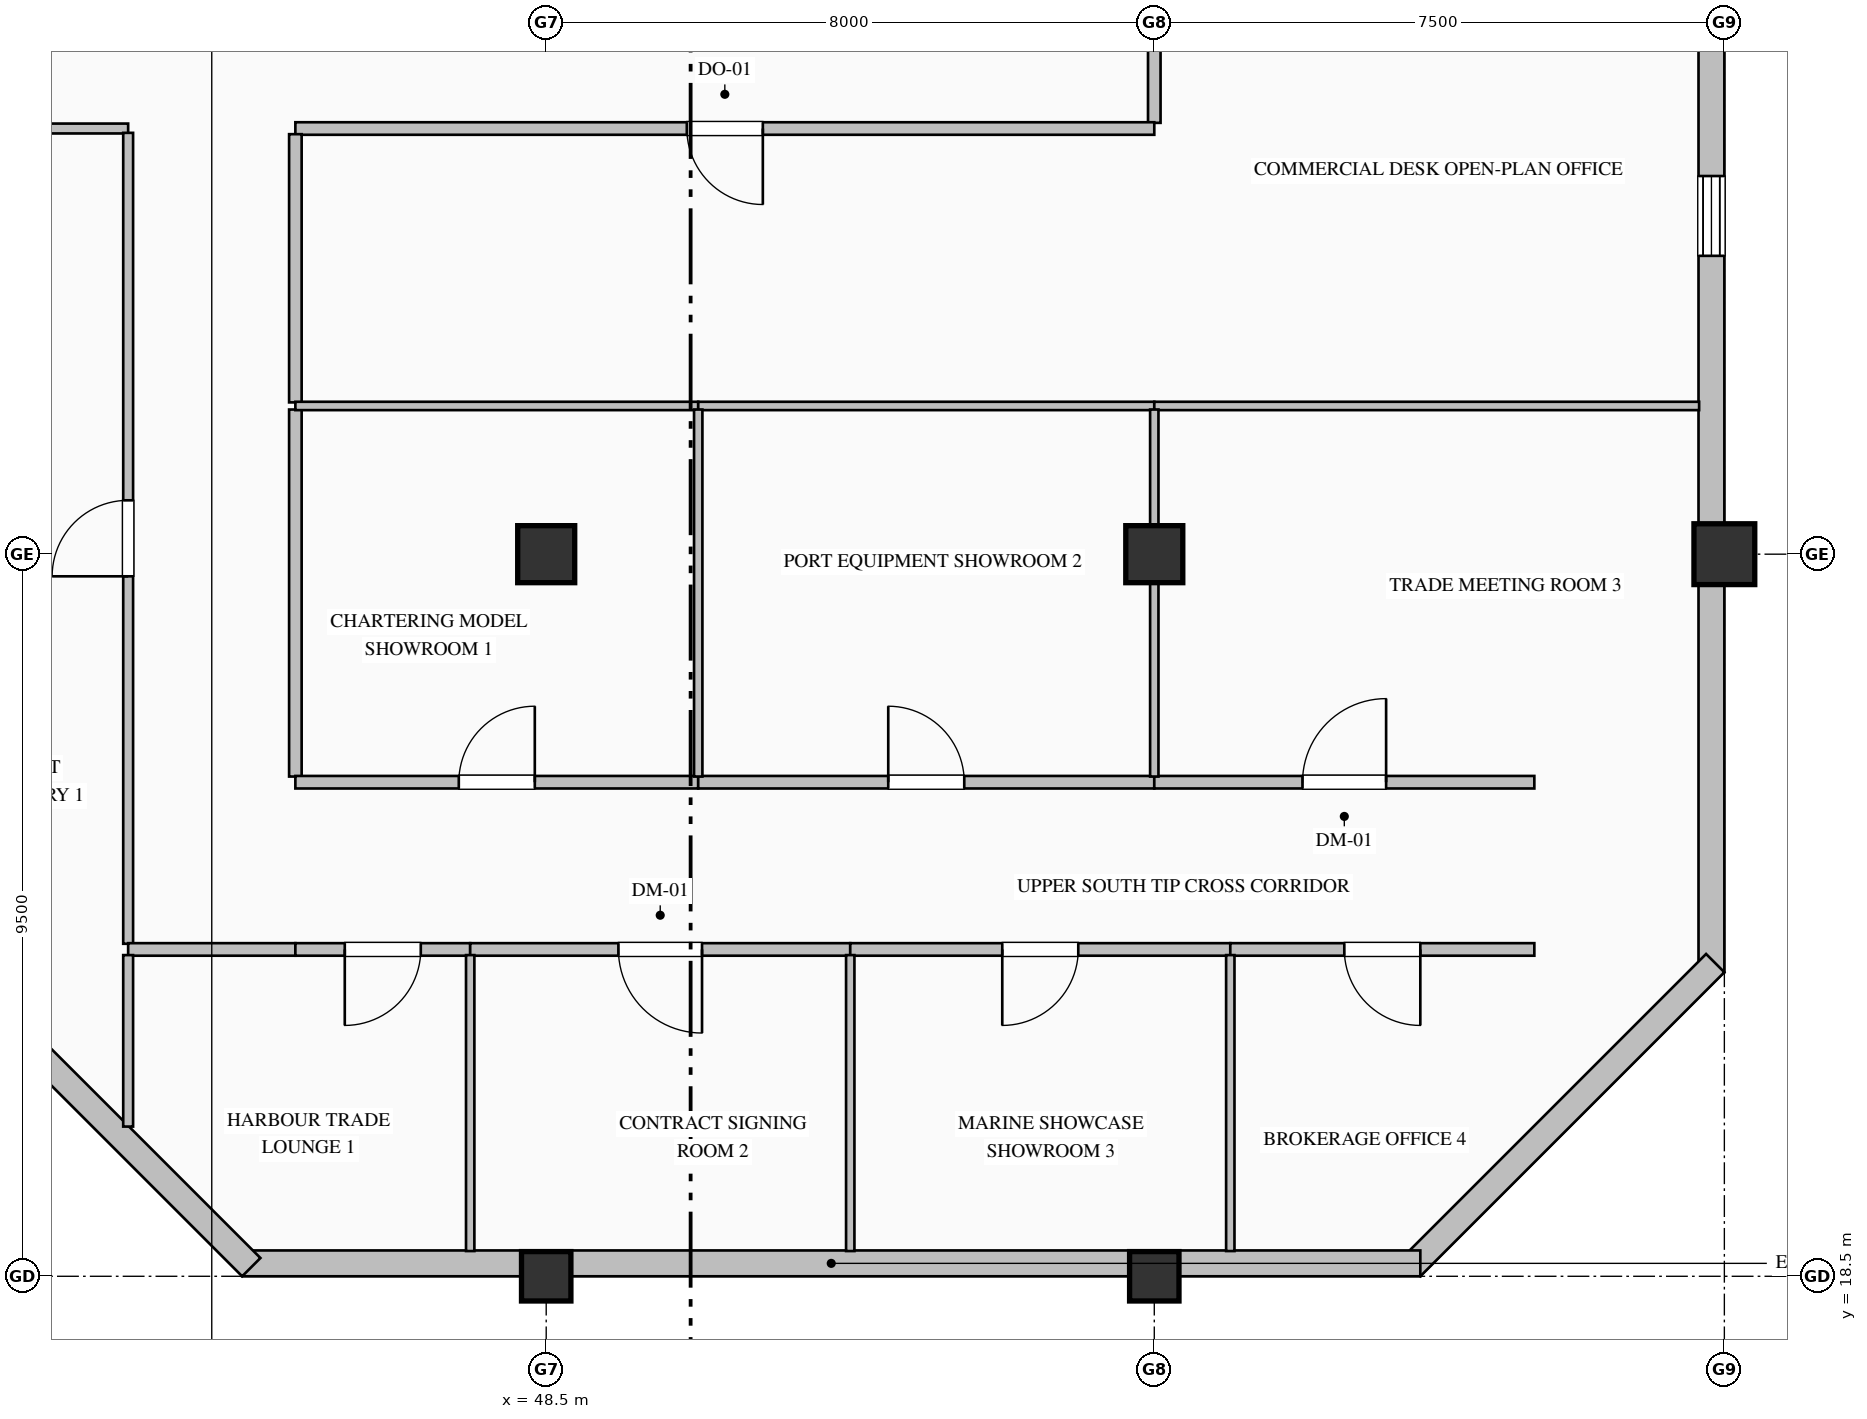
"""IFC4 building model, lengths in metres.
Left out: names, types, materials, properties, quantities, classifications, styles, units other than length and angle.
Written with IfcOpenShell. Run it as: python <this file> out.ifc"""

import sys

from ifc_helpers import new_model, si_unit, direction, frame, frame_2d, origin, origin_2d, place, context, subcontext, project, spatial, rectangle, hollow_rectangle, extrude, element, fill, save


model = new_model("IFC4")
c1 = context("Model", 3, precision=1e-05, world=origin(), true_north=direction((0.0, 1.0)))
c2 = subcontext(c1, "Body", "Model", "MODEL_VIEW")
j1 = project(units=[si_unit("LENGTHUNIT", "METRE"), si_unit("PLANEANGLEUNIT", "RADIAN")], contexts=[c1])
p1 = place(None, origin())
s1 = spatial("IfcSite", under=j1, at=p1, CompositionType="ELEMENT")
p2 = place(p1, origin())
s2 = spatial("IfcBuilding", under=s1, at=p2, CompositionType="ELEMENT")
p3 = place(p2, frame((0.0, 0.0, 351.2)))
s3 = spatial("IfcBuildingStorey", under=s2, at=p3, CompositionType="ELEMENT", Elevation=351.2)
p4 = place(p3, frame((48.5, 18.5, 0.0), z_axis=(0.0, 0.0, 1.0), x_axis=(1.0, 0.0, 0.0)))
e1 = element("IfcColumn", 1, at=p4, inside=s3, PredefinedType="COLUMN", context=c2, shape_type="SweptSolid", body=[
    extrude(hollow_rectangle(XDim=0.65, YDim=0.65, WallThickness=0.028, at=origin_2d()), origin(), (0.0, 0.0, 1.0), 4.0),
])
p5 = place(p3, frame((48.5, 28.0, 0.0), z_axis=(0.0, 0.0, 1.0), x_axis=(1.0, 0.0, 0.0)))
e2 = element("IfcColumn", 2, at=p5, inside=s3, PredefinedType="COLUMN", context=c2, shape_type="SweptSolid", body=[
    extrude(rectangle(XDim=0.75, YDim=0.75, at=origin_2d()), origin(), (0.0, 0.0, 1.0), 4.0),
])
p6 = place(p3, frame((56.5, 18.5, 0.0), z_axis=(0.0, 0.0, 1.0), x_axis=(1.0, 0.0, 0.0)))
e3 = element("IfcColumn", 3, at=p6, inside=s3, PredefinedType="COLUMN", context=c2, shape_type="SweptSolid", body=[
    extrude(hollow_rectangle(XDim=0.65, YDim=0.65, WallThickness=0.028, at=origin_2d()), origin(), (0.0, 0.0, 1.0), 4.0),
])
p7 = place(p3, frame((56.5, 28.0, 0.0), z_axis=(0.0, 0.0, 1.0), x_axis=(1.0, 0.0, 0.0)))
e4 = element("IfcColumn", 4, at=p7, inside=s3, PredefinedType="COLUMN", context=c2, shape_type="SweptSolid", body=[
    extrude(rectangle(XDim=0.75, YDim=0.75, at=origin_2d()), origin(), (0.0, 0.0, 1.0), 4.0),
])
p8 = place(p3, frame((64.0, 28.0, 0.0), z_axis=(0.0, 0.0, 1.0), x_axis=(1.0, 0.0, 0.0)))
e5 = element("IfcColumn", 5, at=p8, inside=s3, PredefinedType="COLUMN", context=c2, shape_type="SweptSolid", body=[
    extrude(hollow_rectangle(XDim=0.8, YDim=0.8, WallThickness=0.032, at=origin_2d()), origin(), (0.0, 0.0, 1.0), 4.0),
])
p9 = place(p3, frame((63.83, 36.05, 0.0), z_axis=(0.0, 0.0, 1.0), x_axis=(0.0, -1.0, 0.0)))
e6 = element("IfcWall", 6, at=p9, inside=s3, PredefinedType="SOLIDWALL", context=c2, shape_type="SweptSolid", body=[
    extrude(rectangle(XDim=13.55, YDim=0.34, at=frame_2d((6.775, 0.0))), origin(), (0.0, 0.0, 1.0), 3.335),
])
p10 = place(p9, frame((3.075, 0.0, 0.8)))
e7 = element("IfcOpeningElement", 7, at=p10, cuts=e6, PredefinedType="OPENING", context=c2, shape_type="SweptSolid", body=[
    extrude(rectangle(XDim=1.05, YDim=2.15, at=frame_2d((0.525, 1.075))), frame((0.0, 0.18, 0.0), z_axis=(0.0, -1.0, 0.0), x_axis=(1.0, 0.0, 0.0)), (0.0, 0.0, 1.0), 0.36),
])
p11 = place(p3, frame((63.88, 22.62, 0.0), z_axis=(0.0, 0.0, 1.0), x_axis=(-0.707106781187, -0.707106781187, 0.0)))
e8 = element("IfcWall", 8, at=p11, inside=s3, PredefinedType="SOLIDWALL", context=c2, shape_type="SweptSolid", body=[
    extrude(rectangle(XDim=5.657, YDim=0.34, at=frame_2d((2.828, 0.0))), origin(), (0.0, 0.0, 1.0), 3.785),
])
p12 = place(p3, frame((60.0, 18.67, 0.0), z_axis=(0.0, 0.0, 1.0), x_axis=(-1.0, 0.0, 0.0)))
e9 = element("IfcWall", 9, at=p12, inside=s3, PredefinedType="SOLIDWALL", context=c2, shape_type="SweptSolid", body=[
    extrude(rectangle(XDim=15.5, YDim=0.34, at=frame_2d((7.75, 0.0))), origin(), (0.0, 0.0, 1.0), 3.335),
])
p13 = place(p3, frame((44.62, 18.62, 0.0), z_axis=(0.0, 0.0, 1.0), x_axis=(-0.707106781187, 0.707106781187, 0.0)))
e10 = element("IfcWall", 10, at=p13, inside=s3, PredefinedType="SOLIDWALL", context=c2, shape_type="SweptSolid", body=[
    extrude(rectangle(XDim=5.657, YDim=0.34, at=frame_2d((2.828, 0.0))), origin(), (0.0, 0.0, 1.0), 3.785),
])
p14 = place(p3, frame((56.5, 36.0, 0.0), z_axis=(0.0, 0.0, 1.0), x_axis=(0.0, -1.0, 0.0)))
e11 = element("IfcWall", 11, at=p14, inside=s3, PredefinedType="PARTITIONING", context=c2, shape_type="SweptSolid", body=[
    extrude(rectangle(XDim=2.325, YDim=0.165, at=frame_2d((1.163, 0.0))), origin(), (0.0, 0.0, 1.0), 3.177),
])
p15 = place(p3, frame((56.5, 33.6, 0.0), z_axis=(0.0, 0.0, 1.0), x_axis=(-1.0, 0.0, 0.0)))
e12 = element("IfcWall", 12, at=p15, inside=s3, PredefinedType="PARTITIONING", context=c2, shape_type="SweptSolid", body=[
    extrude(rectangle(XDim=11.3, YDim=0.165, at=frame_2d((5.65, 0.0))), origin(), (0.0, 0.0, 1.0), 3.785),
])
p16 = place(p15, frame((5.15, 0.0, 0.0)))
e13 = element("IfcOpeningElement", 13, at=p16, cuts=e12, PredefinedType="OPENING", context=c2, shape_type="SweptSolid", body=[
    extrude(rectangle(XDim=1.0, YDim=2.15, at=frame_2d((0.5, 1.075))), frame((0.0, 0.093, 0.0), z_axis=(0.0, -1.0, 0.0), x_axis=(1.0, 0.0, 0.0)), (0.0, 0.0, 1.0), 0.185),
])
p17 = place(p3, frame((43.0, 33.6, 0.0), z_axis=(0.0, 0.0, 1.0), x_axis=(-1.0, 0.0, 0.0)))
e14 = element("IfcWall", 14, at=p17, inside=s3, PredefinedType="PARTITIONING", context=c2, shape_type="SweptSolid", body=[
    extrude(rectangle(XDim=2.5, YDim=0.13, at=frame_2d((1.25, 0.0))), origin(), (0.0, 0.0, 1.0), 3.785),
])
p18 = place(p3, frame((45.2, 33.525, 0.0), z_axis=(0.0, 0.0, 1.0), x_axis=(0.0, -1.0, 0.0)))
e15 = element("IfcWall", 15, at=p18, inside=s3, PredefinedType="PARTITIONING", context=c2, shape_type="SweptSolid", body=[
    extrude(rectangle(XDim=3.528, YDim=0.165, at=frame_2d((1.764, 0.0))), origin(), (0.0, 0.0, 1.0), 3.785),
])
p19 = place(p3, frame((45.2, 29.903, 0.0), z_axis=(0.0, 0.0, 1.0), x_axis=(0.0, -1.0, 0.0)))
e16 = element("IfcWall", 16, at=p19, inside=s3, PredefinedType="PARTITIONING", context=c2, shape_type="SweptSolid", body=[
    extrude(rectangle(XDim=4.829, YDim=0.165, at=frame_2d((2.414, 0.0))), origin(), (0.0, 0.0, 1.0), 3.785),
])
p20 = place(p3, frame((43.0, 22.875, 0.0), z_axis=(0.0, 0.0, 1.0), x_axis=(0.0, 1.0, 0.0)))
e17 = element("IfcWall", 17, at=p20, inside=s3, PredefinedType="PARTITIONING", context=c2, shape_type="SweptSolid", body=[
    extrude(rectangle(XDim=10.668, YDim=0.13, at=frame_2d((5.334, 0.0))), origin(), (0.0, 0.0, 1.0), 3.785),
])
p21 = place(p20, frame((4.834, 0.0, 0.0)))
e18 = element("IfcOpeningElement", 18, at=p21, cuts=e17, PredefinedType="OPENING", context=c2, shape_type="SweptSolid", body=[
    extrude(rectangle(XDim=1.0, YDim=2.15, at=frame_2d((0.5, 1.075))), frame((0.0, 0.075, 0.0), z_axis=(0.0, -1.0, 0.0), x_axis=(1.0, 0.0, 0.0)), (0.0, 0.0, 1.0), 0.15),
])
p22 = place(p3, frame((45.2, 22.8, 0.0), z_axis=(0.0, 0.0, 1.0), x_axis=(-1.0, 0.0, 0.0)))
e19 = element("IfcWall", 19, at=p22, inside=s3, PredefinedType="PARTITIONING", context=c2, shape_type="SweptSolid", body=[
    extrude(rectangle(XDim=2.2, YDim=0.165, at=frame_2d((1.1, 0.0))), origin(), (0.0, 0.0, 1.0), 3.785),
])
p23 = place(p3, frame((45.2, 25.0, 0.0), z_axis=(0.0, 0.0, 1.0), x_axis=(1.0, 0.0, 0.0)))
e20 = element("IfcWall", 20, at=p23, inside=s3, PredefinedType="PARTITIONING", context=c2, shape_type="SweptSolid", body=[
    extrude(rectangle(XDim=5.3, YDim=0.165, at=frame_2d((2.65, 0.0))), origin(), (0.0, 0.0, 1.0), 3.785),
])
p24 = place(p23, frame((2.15, 0.0, 0.0)))
e21 = element("IfcOpeningElement", 21, at=p24, cuts=e20, PredefinedType="OPENING", context=c2, shape_type="SweptSolid", body=[
    extrude(rectangle(XDim=1.0, YDim=2.15, at=frame_2d((0.5, 1.075))), frame((0.0, 0.093, 0.0), z_axis=(0.0, -1.0, 0.0), x_axis=(1.0, 0.0, 0.0)), (0.0, 0.0, 1.0), 0.185),
])
p25 = place(p3, frame((50.5, 25.0, 0.0), z_axis=(0.0, 0.0, 1.0), x_axis=(1.0, 0.0, 0.0)))
e22 = element("IfcWall", 22, at=p25, inside=s3, PredefinedType="PARTITIONING", context=c2, shape_type="SweptSolid", body=[
    extrude(rectangle(XDim=6.0, YDim=0.165, at=frame_2d((3.0, 0.0))), origin(), (0.0, 0.0, 1.0), 3.785),
])
p26 = place(p25, frame((2.5, 0.0, 0.0)))
e23 = element("IfcOpeningElement", 23, at=p26, cuts=e22, PredefinedType="OPENING", context=c2, shape_type="SweptSolid", body=[
    extrude(rectangle(XDim=1.0, YDim=2.15, at=frame_2d((0.5, 1.075))), frame((0.0, 0.093, 0.0), z_axis=(0.0, -1.0, 0.0), x_axis=(1.0, 0.0, 0.0)), (0.0, 0.0, 1.0), 0.185),
])
p27 = place(p3, frame((56.5, 25.0, 0.0), z_axis=(0.0, 0.0, 1.0), x_axis=(1.0, 0.0, 0.0)))
e24 = element("IfcWall", 24, at=p27, inside=s3, PredefinedType="PARTITIONING", context=c2, shape_type="SweptSolid", body=[
    extrude(rectangle(XDim=5.0, YDim=0.165, at=frame_2d((2.5, 0.0))), origin(), (0.0, 0.0, 1.0), 3.785),
])
p28 = place(p27, frame((1.95, 0.0, 0.0)))
e25 = element("IfcOpeningElement", 25, at=p28, cuts=e24, PredefinedType="OPENING", context=c2, shape_type="SweptSolid", body=[
    extrude(rectangle(XDim=1.1, YDim=2.2, at=frame_2d((0.55, 1.1))), frame((0.0, 0.093, 0.0), z_axis=(0.0, -1.0, 0.0), x_axis=(1.0, 0.0, 0.0)), (0.0, 0.0, 1.0), 0.185),
])
p29 = place(p3, frame((47.5, 22.8, 0.0), z_axis=(0.0, 0.0, 1.0), x_axis=(-1.0, 0.0, 0.0)))
e26 = element("IfcWall", 26, at=p29, inside=s3, PredefinedType="PARTITIONING", context=c2, shape_type="SweptSolid", body=[
    extrude(rectangle(XDim=2.3, YDim=0.165, at=frame_2d((1.15, 0.0))), origin(), (0.0, 0.0, 1.0), 3.785),
])
p30 = place(p29, frame((0.65, 0.0, 0.0)))
e27 = element("IfcOpeningElement", 27, at=p30, cuts=e26, PredefinedType="OPENING", context=c2, shape_type="SweptSolid", body=[
    extrude(rectangle(XDim=1.0, YDim=2.15, at=frame_2d((0.5, 1.075))), frame((0.0, 0.093, 0.0), z_axis=(0.0, -1.0, 0.0), x_axis=(1.0, 0.0, 0.0)), (0.0, 0.0, 1.0), 0.185),
])
p31 = place(p3, frame((52.5, 22.8, 0.0), z_axis=(0.0, 0.0, 1.0), x_axis=(-1.0, 0.0, 0.0)))
e28 = element("IfcWall", 28, at=p31, inside=s3, PredefinedType="PARTITIONING", context=c2, shape_type="SweptSolid", body=[
    extrude(rectangle(XDim=5.0, YDim=0.165, at=frame_2d((2.5, 0.0))), origin(), (0.0, 0.0, 1.0), 3.785),
])
p32 = place(p31, frame((1.95, 0.0, 0.0)))
e29 = element("IfcOpeningElement", 29, at=p32, cuts=e28, PredefinedType="OPENING", context=c2, shape_type="SweptSolid", body=[
    extrude(rectangle(XDim=1.1, YDim=2.2, at=frame_2d((0.55, 1.1))), frame((0.0, 0.093, 0.0), z_axis=(0.0, -1.0, 0.0), x_axis=(1.0, 0.0, 0.0)), (0.0, 0.0, 1.0), 0.185),
])
p33 = place(p3, frame((57.5, 22.8, 0.0), z_axis=(0.0, 0.0, 1.0), x_axis=(-1.0, 0.0, 0.0)))
e30 = element("IfcWall", 30, at=p33, inside=s3, PredefinedType="PARTITIONING", context=c2, shape_type="SweptSolid", body=[
    extrude(rectangle(XDim=5.0, YDim=0.165, at=frame_2d((2.5, 0.0))), origin(), (0.0, 0.0, 1.0), 3.785),
])
p34 = place(p33, frame((2.0, 0.0, 0.0)))
e31 = element("IfcOpeningElement", 31, at=p34, cuts=e30, PredefinedType="OPENING", context=c2, shape_type="SweptSolid", body=[
    extrude(rectangle(XDim=1.0, YDim=2.15, at=frame_2d((0.5, 1.075))), frame((0.0, 0.093, 0.0), z_axis=(0.0, -1.0, 0.0), x_axis=(1.0, 0.0, 0.0)), (0.0, 0.0, 1.0), 0.185),
])
p35 = place(p3, frame((61.5, 22.8, 0.0), z_axis=(0.0, 0.0, 1.0), x_axis=(-1.0, 0.0, 0.0)))
e32 = element("IfcWall", 32, at=p35, inside=s3, PredefinedType="PARTITIONING", context=c2, shape_type="SweptSolid", body=[
    extrude(rectangle(XDim=4.0, YDim=0.165, at=frame_2d((2.0, 0.0))), origin(), (0.0, 0.0, 1.0), 3.785),
])
p36 = place(p35, frame((1.5, 0.0, 0.0)))
e33 = element("IfcOpeningElement", 33, at=p36, cuts=e32, PredefinedType="OPENING", context=c2, shape_type="SweptSolid", body=[
    extrude(rectangle(XDim=1.0, YDim=2.15, at=frame_2d((0.5, 1.075))), frame((0.0, 0.093, 0.0), z_axis=(0.0, -1.0, 0.0), x_axis=(1.0, 0.0, 0.0)), (0.0, 0.0, 1.0), 0.185),
])
p37 = place(p3, frame((50.5, 29.95, 0.0), z_axis=(0.0, 0.0, 1.0), x_axis=(-1.0, 0.0, 0.0)))
e34 = element("IfcWall", 34, at=p37, inside=s3, PredefinedType="MOVABLE", context=c2, shape_type="SweptSolid", body=[
    extrude(rectangle(XDim=5.3, YDim=0.11, at=frame_2d((2.65, 0.0))), origin(), (0.0, 0.0, 1.0), 3.785),
])
p38 = place(p3, frame((56.5, 29.95, 0.0), z_axis=(0.0, 0.0, 1.0), x_axis=(-1.0, 0.0, 0.0)))
e35 = element("IfcWall", 35, at=p38, inside=s3, PredefinedType="MOVABLE", context=c2, shape_type="SweptSolid", body=[
    extrude(rectangle(XDim=6.0, YDim=0.11, at=frame_2d((3.0, 0.0))), origin(), (0.0, 0.0, 1.0), 3.785),
])
p39 = place(p3, frame((63.668, 29.95, 0.0), z_axis=(0.0, 0.0, 1.0), x_axis=(-1.0, 0.0, 0.0)))
e36 = element("IfcWall", 36, at=p39, inside=s3, PredefinedType="MOVABLE", context=c2, shape_type="SweptSolid", body=[
    extrude(rectangle(XDim=7.168, YDim=0.11, at=frame_2d((3.584, 0.0))), origin(), (0.0, 0.0, 1.0), 3.785),
])
p40 = place(p3, frame((50.5, 29.903, 0.0), z_axis=(0.0, 0.0, 1.0), x_axis=(0.0, -1.0, 0.0)))
e37 = element("IfcWall", 37, at=p40, inside=s3, PredefinedType="MOVABLE", context=c2, shape_type="SweptSolid", body=[
    extrude(rectangle(XDim=4.829, YDim=0.11, at=frame_2d((2.414, 0.0))), origin(), (0.0, 0.0, 1.0), 3.785),
])
p41 = place(p3, frame((56.5, 29.903, 0.0), z_axis=(0.0, 0.0, 1.0), x_axis=(0.0, -1.0, 0.0)))
e38 = element("IfcWall", 38, at=p41, inside=s3, PredefinedType="MOVABLE", context=c2, shape_type="SweptSolid", body=[
    extrude(rectangle(XDim=4.829, YDim=0.11, at=frame_2d((2.414, 0.0))), origin(), (0.0, 0.0, 1.0), 2.977),
])
p42 = place(p3, frame((43.0, 22.726, 0.0), z_axis=(0.0, 0.0, 1.0), x_axis=(0.0, -1.0, 0.0)))
e39 = element("IfcWall", 39, at=p42, inside=s3, PredefinedType="PARTITIONING", context=c2, shape_type="SweptSolid", body=[
    extrude(rectangle(XDim=2.256, YDim=0.13, at=frame_2d((1.128, 0.0))), origin(), (0.0, 0.0, 1.0), 3.785),
])
for number, where, z_axis, x_axis in (
    (40, (47.5, 22.726, 0.0), (0.0, 0.0, 1.0), (0.0, -1.0, 0.0)),
    (41, (52.5, 22.726, 0.0), (0.0, 0.0, 1.0), (0.0, -1.0, 0.0)),
    (42, (57.5, 22.726, 0.0), (0.0, 0.0, 1.0), (0.0, -1.0, 0.0)),
):
    element("IfcWall", number, at=place(p3, frame(where, z_axis=z_axis, x_axis=x_axis)), inside=s3, PredefinedType="MOVABLE", context=c2, shape_type="SweptSolid", body=[
        extrude(rectangle(XDim=3.894, YDim=0.11, at=frame_2d((1.947, 0.0))), origin(), (0.0, 0.0, 1.0), 3.785),
    ])
p43 = place(p10, origin())
e43 = element("IfcWindow", 43, at=p43, inside=s3, PartitioningType="SINGLE_PANEL", PredefinedType="WINDOW", context=c2, shape_type="SweptSolid", body=[
    extrude(rectangle(XDim=1.05, YDim=2.15, at=frame_2d((0.525, 1.075))), frame((0.0, 0.15, 0.0), z_axis=(0.0, -1.0, 0.0), x_axis=(1.0, 0.0, 0.0)), (0.0, 0.0, 1.0), 0.06),
])
fill(e7, e43)
p44 = place(p16, origin())
e44 = element("IfcDoor", 44, at=p44, inside=s3, OperationType="SINGLE_SWING_LEFT", PredefinedType="DOOR", context=c2, shape_type="SweptSolid", body=[
    extrude(rectangle(XDim=1.0, YDim=2.15, at=frame_2d((0.5, 1.075))), frame((0.0, 0.025, 0.0), z_axis=(0.0, -1.0, 0.0), x_axis=(1.0, 0.0, 0.0)), (0.0, 0.0, 1.0), 0.05),
])
fill(e13, e44)
p45 = place(p24, origin())
e45 = element("IfcDoor", 45, at=p45, inside=s3, OperationType="SINGLE_SWING_RIGHT", PredefinedType="DOOR", context=c2, shape_type="SweptSolid", body=[
    extrude(rectangle(XDim=1.0, YDim=2.15, at=frame_2d((0.5, 1.075))), frame((0.0, 0.025, 0.0), z_axis=(0.0, -1.0, 0.0), x_axis=(1.0, 0.0, 0.0)), (0.0, 0.0, 1.0), 0.05),
])
fill(e21, e45)
p46 = place(p26, origin())
e46 = element("IfcDoor", 46, at=p46, inside=s3, OperationType="SINGLE_SWING_LEFT", PredefinedType="DOOR", context=c2, shape_type="SweptSolid", body=[
    extrude(rectangle(XDim=1.0, YDim=2.15, at=frame_2d((0.5, 1.075))), frame((0.0, 0.025, 0.0), z_axis=(0.0, -1.0, 0.0), x_axis=(1.0, 0.0, 0.0)), (0.0, 0.0, 1.0), 0.05),
])
fill(e23, e46)
p47 = place(p28, origin())
e47 = element("IfcDoor", 47, at=p47, inside=s3, OperationType="SINGLE_SWING_RIGHT", PredefinedType="DOOR", context=c2, shape_type="SweptSolid", body=[
    extrude(rectangle(XDim=1.1, YDim=2.2, at=frame_2d((0.55, 1.1))), frame((0.0, 0.025, 0.0), z_axis=(0.0, -1.0, 0.0), x_axis=(1.0, 0.0, 0.0)), (0.0, 0.0, 1.0), 0.05),
])
fill(e25, e47)
p48 = place(p21, origin())
e48 = element("IfcDoor", 48, at=p48, inside=s3, OperationType="SINGLE_SWING_LEFT", PredefinedType="DOOR", context=c2, shape_type="SweptSolid", body=[
    extrude(rectangle(XDim=1.0, YDim=2.15, at=frame_2d((0.5, 1.075))), frame((0.0, 0.025, 0.0), z_axis=(0.0, -1.0, 0.0), x_axis=(1.0, 0.0, 0.0)), (0.0, 0.0, 1.0), 0.05),
])
fill(e18, e48)
p49 = place(p30, origin())
e49 = element("IfcDoor", 49, at=p49, inside=s3, OperationType="SINGLE_SWING_RIGHT", PredefinedType="DOOR", context=c2, shape_type="SweptSolid", body=[
    extrude(rectangle(XDim=1.0, YDim=2.15, at=frame_2d((0.5, 1.075))), frame((0.0, 0.025, 0.0), z_axis=(0.0, -1.0, 0.0), x_axis=(1.0, 0.0, 0.0)), (0.0, 0.0, 1.0), 0.05),
])
fill(e27, e49)
p50 = place(p32, origin())
e50 = element("IfcDoor", 50, at=p50, inside=s3, OperationType="SINGLE_SWING_LEFT", PredefinedType="DOOR", context=c2, shape_type="SweptSolid", body=[
    extrude(rectangle(XDim=1.1, YDim=2.2, at=frame_2d((0.55, 1.1))), frame((0.0, 0.025, 0.0), z_axis=(0.0, -1.0, 0.0), x_axis=(1.0, 0.0, 0.0)), (0.0, 0.0, 1.0), 0.05),
])
fill(e29, e50)
p51 = place(p34, origin())
e51 = element("IfcDoor", 51, at=p51, inside=s3, OperationType="SINGLE_SWING_RIGHT", PredefinedType="DOOR", context=c2, shape_type="SweptSolid", body=[
    extrude(rectangle(XDim=1.0, YDim=2.15, at=frame_2d((0.5, 1.075))), frame((0.0, 0.025, 0.0), z_axis=(0.0, -1.0, 0.0), x_axis=(1.0, 0.0, 0.0)), (0.0, 0.0, 1.0), 0.05),
])
fill(e31, e51)
p52 = place(p36, origin())
e52 = element("IfcDoor", 52, at=p52, inside=s3, OperationType="SINGLE_SWING_LEFT", PredefinedType="DOOR", context=c2, shape_type="SweptSolid", body=[
    extrude(rectangle(XDim=1.0, YDim=2.15, at=frame_2d((0.5, 1.075))), frame((0.0, 0.025, 0.0), z_axis=(0.0, -1.0, 0.0), x_axis=(1.0, 0.0, 0.0)), (0.0, 0.0, 1.0), 0.05),
])
fill(e33, e52)
save(model, sys.argv[1])
